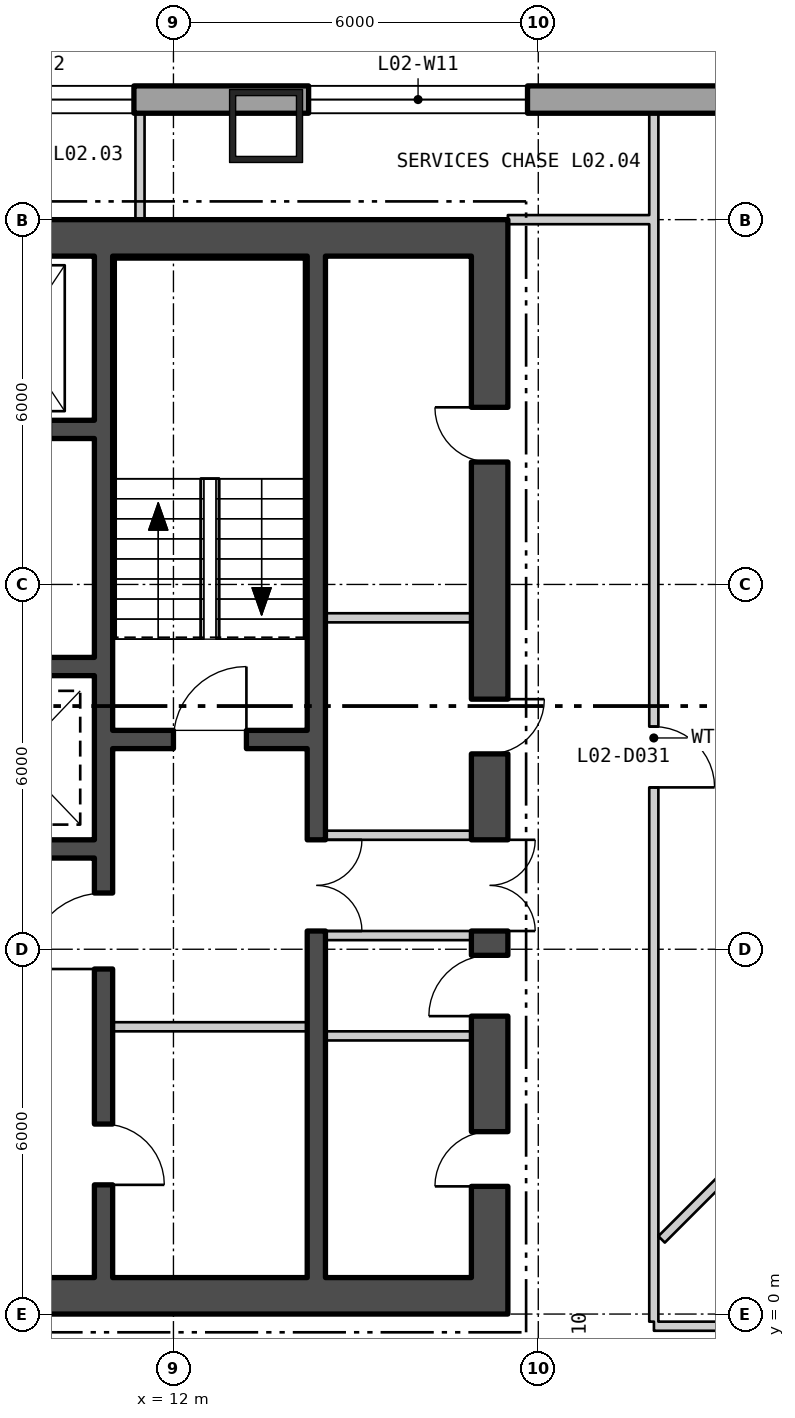
"""IFC4 building model, lengths in metres.
Left out: names, types, materials, properties, quantities, classifications, styles, units other than length and angle.
Written with IfcOpenShell. Run it as: python <this file> out.ifc"""

import sys

from ifc_helpers import new_model, si_unit, direction, frame, frame_2d, origin, origin_2d, place, context, subcontext, project, spatial, polyline, rectangle, hollow_rectangle, outline, extrude, element, fill, save


model = new_model("IFC4")
c1 = context("Model", 3, precision=1e-05, world=origin(), true_north=direction((0.0, 1.0)))
c2 = subcontext(c1, "Body", "Model", "MODEL_VIEW")
j1 = project(units=[si_unit("LENGTHUNIT", "METRE"), si_unit("PLANEANGLEUNIT", "RADIAN")], contexts=[c1])
p1 = place(None, origin())
s1 = spatial("IfcSite", under=j1, at=p1, CompositionType="ELEMENT")
p2 = place(p1, origin())
s2 = spatial("IfcBuilding", under=s1, at=p2, CompositionType="ELEMENT")
p3 = place(p2, frame((0.0, 0.0, 13.5)))
s3 = spatial("IfcBuildingStorey", under=s2, at=p3, CompositionType="ELEMENT", Elevation=13.5)
p4 = place(p3, frame((13.523, 19.54, 0.0), z_axis=(0.0, 0.0, 1.0), x_axis=(-1.0, 0.0, 0.0)))
e1 = element("IfcColumn", 1, at=p4, inside=s3, PredefinedType="COLUMN", context=c2, shape_type="SweptSolid", body=[
    extrude(hollow_rectangle(XDim=1.2, YDim=1.2, WallThickness=0.1, at=origin_2d()), origin(), (0.0, 0.0, 1.0), 5.1),
])
p5 = place(p3, frame((38.775, 19.975, -0.4), z_axis=(0.0, 0.0, 1.0), x_axis=(-1.0, 0.0, 0.0)))
e2 = element("IfcWall", 2, at=p5, inside=s3, PredefinedType="SOLIDWALL", context=c2, shape_type="SweptSolid", body=[
    extrude(outline(polyline([(-0.225, -0.225), (77.775, -0.225), (77.325, 0.225), (0.225, 0.225), (-0.225, -0.225)])), origin(), (0.0, 0.0, 1.0), 5.1),
])
p6 = place(p5, frame((1.958, 0.0, 1.3)))
e3 = element("IfcOpeningElement", 3, at=p6, cuts=e2, PredefinedType="OPENING", context=c2, shape_type="SweptSolid", body=[
    extrude(rectangle(XDim=3.6, YDim=3.2, at=frame_2d((1.8, 1.6))), frame((0.0, 0.235, 0.0), z_axis=(0.0, -1.0, 0.0), x_axis=(1.0, 0.0, 0.0)), (0.0, 0.0, 1.0), 0.47),
])
p7 = place(p5, frame((8.325, 0.0, 1.3)))
e4 = element("IfcOpeningElement", 4, at=p7, cuts=e2, PredefinedType="OPENING", context=c2, shape_type="SweptSolid", body=[
    extrude(rectangle(XDim=3.6, YDim=3.2, at=frame_2d((1.8, 1.6))), frame((0.0, 0.235, 0.0), z_axis=(0.0, -1.0, 0.0), x_axis=(1.0, 0.0, 0.0)), (0.0, 0.0, 1.0), 0.47),
])
p8 = place(p5, frame((20.952, 0.0, 1.3)))
e5 = element("IfcOpeningElement", 5, at=p8, cuts=e2, PredefinedType="OPENING", context=c2, shape_type="SweptSolid", body=[
    extrude(rectangle(XDim=3.6, YDim=3.2, at=frame_2d((1.8, 1.6))), frame((0.0, 0.235, 0.0), z_axis=(0.0, -1.0, 0.0), x_axis=(1.0, 0.0, 0.0)), (0.0, 0.0, 1.0), 0.47),
])
p9 = place(p5, frame((27.425, 0.0, 1.3)))
e6 = element("IfcOpeningElement", 6, at=p9, cuts=e2, PredefinedType="OPENING", context=c2, shape_type="SweptSolid", body=[
    extrude(rectangle(XDim=3.6, YDim=3.2, at=frame_2d((1.8, 1.6))), frame((0.0, 0.235, 0.0), z_axis=(0.0, -1.0, 0.0), x_axis=(1.0, 0.0, 0.0)), (0.0, 0.0, 1.0), 0.47),
])
p10 = place(p5, frame((46.525, 0.0, 1.3)))
e7 = element("IfcOpeningElement", 7, at=p10, cuts=e2, PredefinedType="OPENING", context=c2, shape_type="SweptSolid", body=[
    extrude(rectangle(XDim=3.6, YDim=3.2, at=frame_2d((1.8, 1.6))), frame((0.0, 0.235, 0.0), z_axis=(0.0, -1.0, 0.0), x_axis=(1.0, 0.0, 0.0)), (0.0, 0.0, 1.0), 0.47),
])
p11 = place(p5, frame((52.998, 0.0, 1.3)))
e8 = element("IfcOpeningElement", 8, at=p11, cuts=e2, PredefinedType="OPENING", context=c2, shape_type="SweptSolid", body=[
    extrude(rectangle(XDim=3.6, YDim=3.2, at=frame_2d((1.8, 1.6))), frame((0.0, 0.235, 0.0), z_axis=(0.0, -1.0, 0.0), x_axis=(1.0, 0.0, 0.0)), (0.0, 0.0, 1.0), 0.47),
])
p12 = place(p5, frame((65.625, 0.0, 1.3)))
e9 = element("IfcOpeningElement", 9, at=p12, cuts=e2, PredefinedType="OPENING", context=c2, shape_type="SweptSolid", body=[
    extrude(rectangle(XDim=3.6, YDim=3.2, at=frame_2d((1.8, 1.6))), frame((0.0, 0.235, 0.0), z_axis=(0.0, -1.0, 0.0), x_axis=(1.0, 0.0, 0.0)), (0.0, 0.0, 1.0), 0.47),
])
p13 = place(p5, frame((71.992, 0.0, 1.3)))
e10 = element("IfcOpeningElement", 10, at=p13, cuts=e2, PredefinedType="OPENING", context=c2, shape_type="SweptSolid", body=[
    extrude(rectangle(XDim=3.6, YDim=3.2, at=frame_2d((1.8, 1.6))), frame((0.0, 0.235, 0.0), z_axis=(0.0, -1.0, 0.0), x_axis=(1.0, 0.0, 0.0)), (0.0, 0.0, 1.0), 0.47),
])
p14 = place(p3, frame((-17.5, 0.3, 0.0), z_axis=(0.0, 0.0, 1.0), x_axis=(1.0, 0.0, 0.0)))
e11 = element("IfcWall", 11, at=p14, inside=s3, PredefinedType="SHEAR", context=c2, shape_type="SweptSolid", body=[
    extrude(rectangle(XDim=35.0, YDim=0.6, at=frame_2d((17.5, 0.0))), origin(), (0.0, 0.0, 1.0), 4.88),
])
p15 = place(p14, frame((12.0, 0.0, 0.0)))
e12 = element("IfcOpeningElement", 12, at=p15, cuts=e11, PredefinedType="OPENING", context=c2, shape_type="SweptSolid", body=[
    extrude(rectangle(XDim=1.8, YDim=2.4, at=frame_2d((0.9, 1.2))), frame((0.0, 0.31, 0.0), z_axis=(0.0, -1.0, 0.0), x_axis=(1.0, 0.0, 0.0)), (0.0, 0.0, 1.0), 0.62),
])
p16 = place(p14, frame((22.0, 0.0, 0.0)))
e13 = element("IfcOpeningElement", 13, at=p16, cuts=e11, PredefinedType="OPENING", context=c2, shape_type="SweptSolid", body=[
    extrude(rectangle(XDim=1.8, YDim=2.4, at=frame_2d((0.9, 1.2))), frame((0.0, 0.31, 0.0), z_axis=(0.0, -1.0, 0.0), x_axis=(1.0, 0.0, 0.0)), (0.0, 0.0, 1.0), 0.62),
])
p17 = place(p3, frame((-17.5, 17.7, 0.0), z_axis=(0.0, 0.0, 1.0), x_axis=(1.0, 0.0, 0.0)))
e14 = element("IfcWall", 14, at=p17, inside=s3, PredefinedType="SHEAR", context=c2, shape_type="SweptSolid", body=[
    extrude(rectangle(XDim=35.0, YDim=0.6, at=frame_2d((17.5, 0.0))), origin(), (0.0, 0.0, 1.0), 4.88),
])
p18 = place(p3, frame((17.2, 0.6, 0.0), z_axis=(0.0, 0.0, 1.0), x_axis=(0.0, 1.0, 0.0)))
e15 = element("IfcWall", 15, at=p18, inside=s3, PredefinedType="SHEAR", context=c2, shape_type="SweptSolid", body=[
    extrude(rectangle(XDim=16.8, YDim=0.6, at=frame_2d((8.4, 0.0))), origin(), (0.0, 0.0, 1.0), 4.88),
])
p19 = place(p18, frame((5.7, 0.0, 0.0)))
e16 = element("IfcOpeningElement", 16, at=p19, cuts=e15, PredefinedType="OPENING", context=c2, shape_type="SweptSolid", body=[
    extrude(rectangle(XDim=1.5, YDim=2.1, at=frame_2d((0.75, 1.05))), frame((0.0, 0.31, 0.0), z_axis=(0.0, -1.0, 0.0), x_axis=(1.0, 0.0, 0.0)), (0.0, 0.0, 1.0), 0.62),
])
p20 = place(p18, frame((1.5, 0.0, 0.0)))
e17 = element("IfcOpeningElement", 17, at=p20, cuts=e15, PredefinedType="OPENING", context=c2, shape_type="SweptSolid", body=[
    extrude(rectangle(XDim=0.9, YDim=2.1, at=frame_2d((0.45, 1.05))), frame((0.0, 0.31, 0.0), z_axis=(0.0, -1.0, 0.0), x_axis=(1.0, 0.0, 0.0)), (0.0, 0.0, 1.0), 0.62),
])
p21 = place(p18, frame((4.3, 0.0, 0.0)))
e18 = element("IfcOpeningElement", 18, at=p21, cuts=e15, PredefinedType="OPENING", context=c2, shape_type="SweptSolid", body=[
    extrude(rectangle(XDim=1.0, YDim=2.1, at=frame_2d((0.5, 1.05))), frame((0.0, 0.31, 0.0), z_axis=(0.0, -1.0, 0.0), x_axis=(1.0, 0.0, 0.0)), (0.0, 0.0, 1.0), 0.62),
])
p22 = place(p18, frame((8.613, 0.0, 0.0)))
e19 = element("IfcOpeningElement", 19, at=p22, cuts=e15, PredefinedType="OPENING", context=c2, shape_type="SweptSolid", body=[
    extrude(rectangle(XDim=0.9, YDim=2.1, at=frame_2d((0.45, 1.05))), frame((0.0, 0.31, 0.0), z_axis=(0.0, -1.0, 0.0), x_axis=(1.0, 0.0, 0.0)), (0.0, 0.0, 1.0), 0.62),
])
p23 = place(p18, frame((13.413, 0.0, 0.0)))
e20 = element("IfcOpeningElement", 20, at=p23, cuts=e15, PredefinedType="OPENING", context=c2, shape_type="SweptSolid", body=[
    extrude(rectangle(XDim=0.9, YDim=2.1, at=frame_2d((0.45, 1.05))), frame((0.0, 0.31, 0.0), z_axis=(0.0, -1.0, 0.0), x_axis=(1.0, 0.0, 0.0)), (0.0, 0.0, 1.0), 0.62),
])
p24 = place(p3, frame((10.85, 0.6, 0.0), z_axis=(0.0, 0.0, 1.0), x_axis=(0.0, 1.0, 0.0)))
e21 = element("IfcWall", 21, at=p24, inside=s3, PredefinedType="SHEAR", context=c2, shape_type="SweptSolid", body=[
    extrude(rectangle(XDim=16.8, YDim=0.3, at=frame_2d((8.4, 0.0))), origin(), (0.0, 0.0, 1.0), 4.88),
])
p25 = place(p24, frame((5.075, 0.0, 0.0)))
e22 = element("IfcOpeningElement", 22, at=p25, cuts=e21, PredefinedType="OPENING", context=c2, shape_type="SweptSolid", body=[
    extrude(rectangle(XDim=1.25, YDim=2.1, at=frame_2d((0.625, 1.05))), frame((0.0, 0.16, 0.0), z_axis=(0.0, -1.0, 0.0), x_axis=(1.0, 0.0, 0.0)), (0.0, 0.0, 1.0), 0.32),
])
p26 = place(p24, frame((1.525, 0.0, 0.0)))
e23 = element("IfcOpeningElement", 23, at=p26, cuts=e21, PredefinedType="OPENING", context=c2, shape_type="SweptSolid", body=[
    extrude(rectangle(XDim=1.0, YDim=2.1, at=frame_2d((0.5, 1.05))), frame((0.0, 0.16, 0.0), z_axis=(0.0, -1.0, 0.0), x_axis=(1.0, 0.0, 0.0)), (0.0, 0.0, 1.0), 0.32),
])
p27 = place(p3, frame((14.35, 0.6, 0.0), z_axis=(0.0, 0.0, 1.0), x_axis=(0.0, 1.0, 0.0)))
e24 = element("IfcWall", 24, at=p27, inside=s3, PredefinedType="SHEAR", context=c2, shape_type="SweptSolid", body=[
    extrude(rectangle(XDim=16.8, YDim=0.3, at=frame_2d((8.4, 0.0))), origin(), (0.0, 0.0, 1.0), 4.88),
])
p28 = place(p27, frame((5.7, 0.0, 0.0)))
e25 = element("IfcOpeningElement", 25, at=p28, cuts=e24, PredefinedType="OPENING", context=c2, shape_type="SweptSolid", body=[
    extrude(rectangle(XDim=1.5, YDim=2.1, at=frame_2d((0.75, 1.05))), frame((0.0, 0.16, 0.0), z_axis=(0.0, -1.0, 0.0), x_axis=(1.0, 0.0, 0.0)), (0.0, 0.0, 1.0), 0.32),
])
p29 = place(p3, frame((11.0, 9.45, 0.0), z_axis=(0.0, 0.0, 1.0), x_axis=(1.0, 0.0, 0.0)))
e26 = element("IfcWall", 26, at=p29, inside=s3, PredefinedType="SHEAR", context=c2, shape_type="SweptSolid", body=[
    extrude(rectangle(XDim=3.2, YDim=0.3, at=frame_2d((1.6, 0.0))), origin(), (0.0, 0.0, 1.0), 4.88),
])
p30 = place(p29, frame((1.0, 0.0, 0.0)))
e27 = element("IfcOpeningElement", 27, at=p30, cuts=e26, PredefinedType="OPENING", context=c2, shape_type="SweptSolid", body=[
    extrude(rectangle(XDim=1.2, YDim=2.1, at=frame_2d((0.6, 1.05))), frame((0.0, 0.16, 0.0), z_axis=(0.0, -1.0, 0.0), x_axis=(1.0, 0.0, 0.0)), (0.0, 0.0, 1.0), 0.32),
])
p31 = place(p3, frame((-10.7, 14.55, 0.0), z_axis=(0.0, 0.0, 1.0), x_axis=(1.0, 0.0, 0.0)))
e28 = element("IfcWall", 28, at=p31, inside=s3, PredefinedType="SHEAR", context=c2, shape_type="SweptSolid", body=[
    extrude(rectangle(XDim=21.4, YDim=0.3, at=frame_2d((10.7, 0.0))), origin(), (0.0, 0.0, 1.0), 4.88),
])
p32 = place(p31, frame((0.738, 0.0, 0.0)))
e29 = element("IfcOpeningElement", 29, at=p32, cuts=e28, PredefinedType="OPENING", context=c2, shape_type="SweptSolid", body=[
    extrude(rectangle(XDim=1.1, YDim=2.1, at=frame_2d((0.55, 1.05))), frame((0.0, 0.16, 0.0), z_axis=(0.0, -1.0, 0.0), x_axis=(1.0, 0.0, 0.0)), (0.0, 0.0, 1.0), 0.32),
])
p33 = place(p31, frame((3.462, 0.0, 0.0)))
e30 = element("IfcOpeningElement", 30, at=p33, cuts=e28, PredefinedType="OPENING", context=c2, shape_type="SweptSolid", body=[
    extrude(rectangle(XDim=1.1, YDim=2.1, at=frame_2d((0.55, 1.05))), frame((0.0, 0.16, 0.0), z_axis=(0.0, -1.0, 0.0), x_axis=(1.0, 0.0, 0.0)), (0.0, 0.0, 1.0), 0.32),
])
p34 = place(p31, frame((6.138, 0.0, 0.0)))
e31 = element("IfcOpeningElement", 31, at=p34, cuts=e28, PredefinedType="OPENING", context=c2, shape_type="SweptSolid", body=[
    extrude(rectangle(XDim=1.1, YDim=2.1, at=frame_2d((0.55, 1.05))), frame((0.0, 0.16, 0.0), z_axis=(0.0, -1.0, 0.0), x_axis=(1.0, 0.0, 0.0)), (0.0, 0.0, 1.0), 0.32),
])
p35 = place(p31, frame((8.812, 0.0, 0.0)))
e32 = element("IfcOpeningElement", 32, at=p35, cuts=e28, PredefinedType="OPENING", context=c2, shape_type="SweptSolid", body=[
    extrude(rectangle(XDim=1.1, YDim=2.1, at=frame_2d((0.55, 1.05))), frame((0.0, 0.16, 0.0), z_axis=(0.0, -1.0, 0.0), x_axis=(1.0, 0.0, 0.0)), (0.0, 0.0, 1.0), 0.32),
])
p36 = place(p31, frame((14.162, 0.0, 0.0)))
e33 = element("IfcOpeningElement", 33, at=p36, cuts=e28, PredefinedType="OPENING", context=c2, shape_type="SweptSolid", body=[
    extrude(rectangle(XDim=1.1, YDim=2.1, at=frame_2d((0.55, 1.05))), frame((0.0, 0.16, 0.0), z_axis=(0.0, -1.0, 0.0), x_axis=(1.0, 0.0, 0.0)), (0.0, 0.0, 1.0), 0.32),
])
p37 = place(p31, frame((16.837, 0.0, 0.0)))
e34 = element("IfcOpeningElement", 34, at=p37, cuts=e28, PredefinedType="OPENING", context=c2, shape_type="SweptSolid", body=[
    extrude(rectangle(XDim=1.1, YDim=2.1, at=frame_2d((0.55, 1.05))), frame((0.0, 0.16, 0.0), z_axis=(0.0, -1.0, 0.0), x_axis=(1.0, 0.0, 0.0)), (0.0, 0.0, 1.0), 0.32),
])
p38 = place(p31, frame((19.562, 0.0, 0.0)))
e35 = element("IfcOpeningElement", 35, at=p38, cuts=e28, PredefinedType="OPENING", context=c2, shape_type="SweptSolid", body=[
    extrude(rectangle(XDim=1.1, YDim=2.1, at=frame_2d((0.55, 1.05))), frame((0.0, 0.16, 0.0), z_axis=(0.0, -1.0, 0.0), x_axis=(1.0, 0.0, 0.0)), (0.0, 0.0, 1.0), 0.32),
])
for number, where, z_axis, x_axis in (
    (36, (2.6, 10.65, 0.0), (0.0, 0.0, 1.0), (1.0, 0.0, 0.0)),
    (37, (2.6, 7.65, 0.0), (0.0, 0.0, 1.0), (1.0, 0.0, 0.0)),
):
    element("IfcWall", number, at=place(p3, frame(where, z_axis=z_axis, x_axis=x_axis)), inside=s3, PredefinedType="SHEAR", context=c2, shape_type="SweptSolid", body=[
        extrude(rectangle(XDim=8.1, YDim=0.3, at=frame_2d((4.05, 0.0))), origin(), (0.0, 0.0, 1.0), 4.88),
    ])
p39 = place(p3, frame((11.0, 4.725, 0.0), z_axis=(0.0, 0.0, 1.0), x_axis=(1.0, 0.0, 0.0)))
e38 = element("IfcWall", 38, at=p39, inside=s3, PredefinedType="PARTITIONING", context=c2, shape_type="SweptSolid", body=[
    extrude(rectangle(XDim=3.2, YDim=0.15, at=frame_2d((1.6, 0.0))), origin(), (0.0, 0.0, 1.0), 4.88),
])
for number, where, z_axis, x_axis in (
    (39, (14.5, 6.225, 0.0), (0.0, 0.0, 1.0), (1.0, 0.0, 0.0)),
    (40, (14.5, 7.875, 0.0), (0.0, 0.0, 1.0), (1.0, 0.0, 0.0)),
    (41, (14.5, 4.575, 0.0), (0.0, 0.0, 1.0), (1.0, 0.0, 0.0)),
    (42, (14.5, 11.451, 0.0), (0.0, 0.0, 1.0), (1.0, 0.0, 0.0)),
):
    element("IfcWall", number, at=place(p3, frame(where, z_axis=z_axis, x_axis=x_axis)), inside=s3, PredefinedType="PARTITIONING", context=c2, shape_type="SweptSolid", body=[
        extrude(rectangle(XDim=2.4, YDim=0.15, at=frame_2d((1.2, 0.0))), origin(), (0.0, 0.0, 1.0), 4.88),
    ])
p40 = place(p3, frame((11.45, 18.0, 0.0), z_axis=(0.0, 0.0, 1.0), x_axis=(0.0, 1.0, 0.0)))
e43 = element("IfcWall", 43, at=p40, inside=s3, PredefinedType="PARTITIONING", context=c2, shape_type="SweptSolid", body=[
    extrude(rectangle(XDim=1.75, YDim=0.15, at=frame_2d((0.875, 0.0))), origin(), (0.0, 0.0, 1.0), 4.88),
])
p41 = place(p3, frame((17.5, 18.0, 0.0), z_axis=(0.0, 0.0, 1.0), x_axis=(1.0, 0.0, 0.0)))
e44 = element("IfcWall", 44, at=p41, inside=s3, PredefinedType="PARTITIONING", context=c2, shape_type="SweptSolid", body=[
    extrude(rectangle(XDim=2.475, YDim=0.15, at=frame_2d((1.238, 0.0))), origin(), (0.0, 0.0, 1.0), 4.33),
])
p42 = place(p3, frame((19.9, -0.125, 0.0), z_axis=(0.0, 0.0, 1.0), x_axis=(0.0, 1.0, 0.0)))
e45 = element("IfcWall", 45, at=p42, inside=s3, PredefinedType="PARTITIONING", context=c2, shape_type="SweptSolid", body=[
    extrude(rectangle(XDim=1.15, YDim=0.15, at=frame_2d((0.575, 0.0))), origin(), (0.0, 0.0, 1.0), 4.88),
])
p43 = place(p3, frame((19.9, 1.025, 0.0), z_axis=(0.0, 0.0, 1.0), x_axis=(0.0, 1.0, 0.0)))
e46 = element("IfcWall", 46, at=p43, inside=s3, PredefinedType="PARTITIONING", context=c2, shape_type="SweptSolid", body=[
    extrude(rectangle(XDim=16.9, YDim=0.15, at=frame_2d((8.45, 0.0))), origin(), (0.0, 0.0, 1.0), 4.88),
])
p44 = place(p43, frame((7.637, 0.0, 0.0)))
e47 = element("IfcOpeningElement", 47, at=p44, cuts=e46, PredefinedType="OPENING", context=c2, shape_type="SweptSolid", body=[
    extrude(rectangle(XDim=1.0, YDim=2.1, at=frame_2d((0.5, 1.05))), frame((0.0, 0.085, 0.0), z_axis=(0.0, -1.0, 0.0), x_axis=(1.0, 0.0, 0.0)), (0.0, 0.0, 1.0), 0.17),
])
p45 = place(p3, frame((19.9, 18.075, 0.0), z_axis=(0.0, 0.0, 1.0), x_axis=(0.0, 1.0, 0.0)))
e48 = element("IfcWall", 48, at=p45, inside=s3, PredefinedType="PARTITIONING", context=c2, shape_type="SweptSolid", body=[
    extrude(rectangle(XDim=1.675, YDim=0.15, at=frame_2d((0.838, 0.0))), origin(), (0.0, 0.0, 1.0), 4.88),
])
p46 = place(p3, frame((19.902, -0.2, 0.0), z_axis=(0.0, 0.0, 1.0), x_axis=(1.0, 0.0, 0.0)))
e49 = element("IfcWall", 49, at=p46, inside=s3, PredefinedType="PARTITIONING", context=c2, shape_type="SweptSolid", body=[
    extrude(rectangle(XDim=6.848, YDim=0.15, at=frame_2d((3.424, 0.0))), origin(), (0.0, 0.0, 1.0), 4.88),
])
p47 = place(p46, frame((1.713, 0.0, 0.0)))
e50 = element("IfcOpeningElement", 50, at=p47, cuts=e49, PredefinedType="OPENING", context=c2, shape_type="SweptSolid", body=[
    extrude(rectangle(XDim=1.0, YDim=2.1, at=frame_2d((0.5, 1.05))), frame((0.0, 0.085, 0.0), z_axis=(0.0, -1.0, 0.0), x_axis=(1.0, 0.0, 0.0)), (0.0, 0.0, 1.0), 0.17),
])
p48 = place(p3, frame((20.028, 1.228, 0.0), z_axis=(0.0, 0.0, 1.0), x_axis=(0.707106781187, 0.707106781187, 0.0)))
e51 = element("IfcWall", 51, at=p48, inside=s3, PredefinedType="PARTITIONING", context=c2, shape_type="SweptSolid", body=[
    extrude(rectangle(XDim=7.586, YDim=0.15, at=frame_2d((3.793, 0.0))), origin(), (0.0, 0.0, 1.0), 4.88),
])
p49 = place(p8, origin())
e52 = element("IfcWindow", 52, at=p49, inside=s3, PartitioningType="SINGLE_PANEL", PredefinedType="WINDOW", context=c2, shape_type="SweptSolid", body=[
    extrude(rectangle(XDim=3.6, YDim=3.2, at=frame_2d((1.8, 1.6))), frame((0.0, 0.105, 0.0), z_axis=(0.0, -1.0, 0.0), x_axis=(1.0, 0.0, 0.0)), (0.0, 0.0, 1.0), 0.06),
])
fill(e5, e52)
p50 = place(p9, origin())
e53 = element("IfcWindow", 53, at=p50, inside=s3, PartitioningType="SINGLE_PANEL", PredefinedType="WINDOW", context=c2, shape_type="SweptSolid", body=[
    extrude(rectangle(XDim=3.6, YDim=3.2, at=frame_2d((1.8, 1.6))), frame((0.0, 0.105, 0.0), z_axis=(0.0, -1.0, 0.0), x_axis=(1.0, 0.0, 0.0)), (0.0, 0.0, 1.0), 0.06),
])
fill(e6, e53)
p51 = place(p30, origin())
e54 = element("IfcDoor", 54, at=p51, inside=s3, OperationType="SINGLE_SWING_LEFT", PredefinedType="DOOR", context=c2, shape_type="SweptSolid", body=[
    extrude(rectangle(XDim=1.2, YDim=2.1, at=frame_2d((0.6, 1.05))), frame((0.0, 0.025, 0.0), z_axis=(0.0, -1.0, 0.0), x_axis=(1.0, 0.0, 0.0)), (0.0, 0.0, 1.0), 0.05),
])
fill(e27, e54)
p52 = place(p25, origin())
e55 = element("IfcDoor", 55, at=p52, inside=s3, OperationType="SINGLE_SWING_RIGHT", PredefinedType="DOOR", context=c2, shape_type="SweptSolid", body=[
    extrude(rectangle(XDim=1.25, YDim=2.1, at=frame_2d((0.625, 1.05))), frame((0.0, 0.025, 0.0), z_axis=(0.0, -1.0, 0.0), x_axis=(1.0, 0.0, 0.0)), (0.0, 0.0, 1.0), 0.05),
])
fill(e22, e55)
p53 = place(p26, origin())
e56 = element("IfcDoor", 56, at=p53, inside=s3, OperationType="SINGLE_SWING_LEFT", PredefinedType="DOOR", context=c2, shape_type="SweptSolid", body=[
    extrude(rectangle(XDim=1.0, YDim=2.1, at=frame_2d((0.5, 1.05))), frame((0.0, 0.025, 0.0), z_axis=(0.0, -1.0, 0.0), x_axis=(1.0, 0.0, 0.0)), (0.0, 0.0, 1.0), 0.05),
])
fill(e23, e56)
p54 = place(p28, origin())
e57 = element("IfcDoor", 57, at=p54, inside=s3, OperationType="DOUBLE_DOOR_SINGLE_SWING", PredefinedType="DOOR", context=c2, shape_type="SweptSolid", body=[
    extrude(rectangle(XDim=1.5, YDim=2.1, at=frame_2d((0.75, 1.05))), frame((0.0, 0.025, 0.0), z_axis=(0.0, -1.0, 0.0), x_axis=(1.0, 0.0, 0.0)), (0.0, 0.0, 1.0), 0.05),
])
fill(e25, e57)
p55 = place(p19, origin())
e58 = element("IfcDoor", 58, at=p55, inside=s3, OperationType="DOUBLE_DOOR_SINGLE_SWING", PredefinedType="DOOR", context=c2, shape_type="SweptSolid", body=[
    extrude(rectangle(XDim=1.5, YDim=2.1, at=frame_2d((0.75, 1.05))), frame((0.0, 0.025, 0.0), z_axis=(0.0, -1.0, 0.0), x_axis=(1.0, 0.0, 0.0)), (0.0, 0.0, 1.0), 0.05),
])
fill(e16, e58)
p56 = place(p20, origin())
e59 = element("IfcDoor", 59, at=p56, inside=s3, OperationType="SINGLE_SWING_RIGHT", PredefinedType="DOOR", context=c2, shape_type="SweptSolid", body=[
    extrude(rectangle(XDim=0.9, YDim=2.1, at=frame_2d((0.45, 1.05))), frame((0.0, 0.025, 0.0), z_axis=(0.0, -1.0, 0.0), x_axis=(1.0, 0.0, 0.0)), (0.0, 0.0, 1.0), 0.05),
])
fill(e17, e59)
p57 = place(p21, origin())
e60 = element("IfcDoor", 60, at=p57, inside=s3, OperationType="SINGLE_SWING_RIGHT", PredefinedType="DOOR", context=c2, shape_type="SweptSolid", body=[
    extrude(rectangle(XDim=1.0, YDim=2.1, at=frame_2d((0.5, 1.05))), frame((0.0, 0.025, 0.0), z_axis=(0.0, -1.0, 0.0), x_axis=(1.0, 0.0, 0.0)), (0.0, 0.0, 1.0), 0.05),
])
fill(e18, e60)
p58 = place(p22, origin())
e61 = element("IfcDoor", 61, at=p58, inside=s3, OperationType="SINGLE_SWING_RIGHT", PredefinedType="DOOR", context=c2, shape_type="SweptSolid", body=[
    extrude(rectangle(XDim=0.9, YDim=2.1, at=frame_2d((0.45, 1.05))), frame((0.0, 0.025, 0.0), z_axis=(0.0, -1.0, 0.0), x_axis=(1.0, 0.0, 0.0)), (0.0, 0.0, 1.0), 0.05),
])
fill(e19, e61)
p59 = place(p23, origin())
e62 = element("IfcDoor", 62, at=p59, inside=s3, OperationType="SINGLE_SWING_LEFT", PredefinedType="DOOR", context=c2, shape_type="SweptSolid", body=[
    extrude(rectangle(XDim=0.9, YDim=2.1, at=frame_2d((0.45, 1.05))), frame((0.0, 0.025, 0.0), z_axis=(0.0, -1.0, 0.0), x_axis=(1.0, 0.0, 0.0)), (0.0, 0.0, 1.0), 0.05),
])
fill(e20, e62)
p60 = place(p44, origin())
e63 = element("IfcDoor", 63, at=p60, inside=s3, OperationType="SINGLE_SWING_LEFT", PredefinedType="DOOR", context=c2, shape_type="SweptSolid", body=[
    extrude(rectangle(XDim=1.0, YDim=2.1, at=frame_2d((0.5, 1.05))), frame((0.0, 0.025, 0.0), z_axis=(0.0, -1.0, 0.0), x_axis=(1.0, 0.0, 0.0)), (0.0, 0.0, 1.0), 0.05),
])
fill(e47, e63)
save(model, sys.argv[1])
